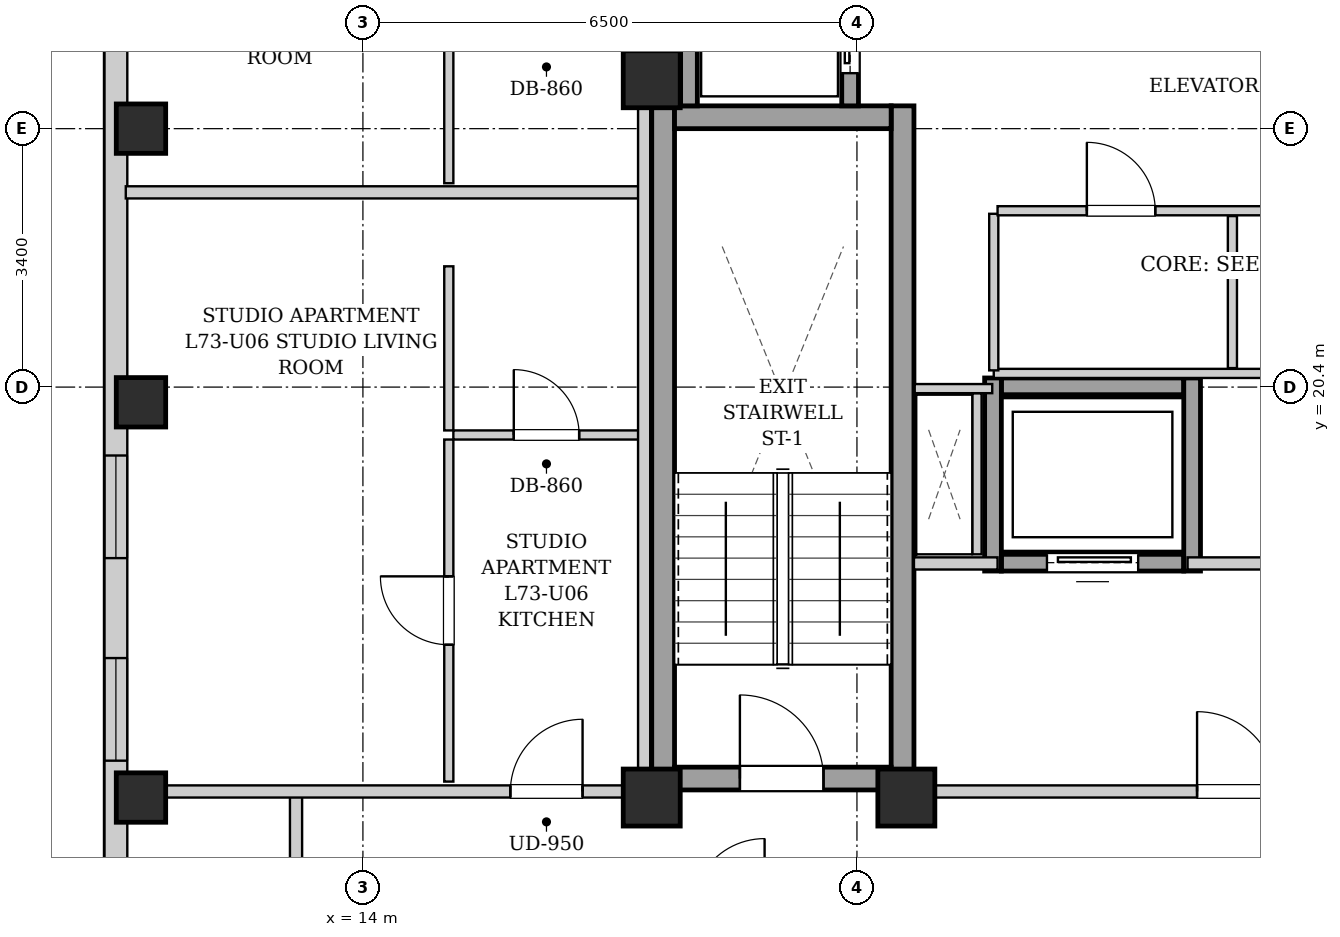
"""IFC4 building model, lengths in metres.
Left out: names, types, materials, properties, quantities, classifications, styles, units other than length and angle.
Written with IfcOpenShell. Run it as: python <this file> out.ifc"""

import sys

from ifc_helpers import new_model, si_unit, direction, frame, frame_2d, origin, origin_2d, place, context, subcontext, project, spatial, rectangle, extrude, element, fill, save


model = new_model("IFC4")
c1 = context("Model", 3, precision=1e-05, world=origin(), true_north=direction((0.0, 1.0)))
c2 = subcontext(c1, "Body", "Model", "MODEL_VIEW")
j1 = project(units=[si_unit("LENGTHUNIT", "METRE"), si_unit("PLANEANGLEUNIT", "RADIAN")], contexts=[c1])
p1 = place(None, origin())
s1 = spatial("IfcSite", under=j1, at=p1, CompositionType="ELEMENT")
p2 = place(p1, origin())
s2 = spatial("IfcBuilding", under=s1, at=p2, CompositionType="ELEMENT")
p3 = place(p2, frame((0.0, 0.0, 251.3)))
s3 = spatial("IfcBuildingStorey", under=s2, at=p3, CompositionType="ELEMENT", Elevation=251.3)
for number, where, z_axis, x_axis in (
    (1, (11.08, 15.0, 0.0), (0.0, 0.0, 1.0), (1.0, 0.0, 0.0)),
    (2, (11.08, 20.2, 0.0), (0.0, 0.0, 1.0), (1.0, 0.0, 0.0)),
    (3, (11.08, 23.8, 0.0), (0.0, 0.0, 1.0), (1.0, 0.0, 0.0)),
):
    element("IfcColumn", number, at=place(p3, frame(where, z_axis=z_axis, x_axis=x_axis)), inside=s3, PredefinedType="COLUMN", context=c2, shape_type="SweptSolid", body=[
        extrude(rectangle(XDim=0.65, YDim=0.65, at=origin_2d()), origin(), (0.0, 0.0, 1.0), 3.4),
    ])
for number, where, z_axis, x_axis in (
    (4, (17.8, 15.0, 0.0), (0.0, 0.0, 1.0), (1.0, 0.0, 0.0)),
    (5, (21.15, 15.0, 0.0), (0.0, 0.0, 1.0), (1.0, 0.0, 0.0)),
    (6, (17.8, 24.45, 0.0), (0.0, 0.0, 1.0), (1.0, 0.0, 0.0)),
):
    element("IfcColumn", number, at=place(p3, frame(where, z_axis=z_axis, x_axis=x_axis)), inside=s3, PredefinedType="COLUMN", context=c2, shape_type="SweptSolid", body=[
        extrude(rectangle(XDim=0.75, YDim=0.75, at=origin_2d()), origin(), (0.0, 0.0, 1.0), 3.4),
    ])
p4 = place(p3, frame((10.75, 6.3, 0.0), z_axis=(0.0, 0.0, 1.0), x_axis=(0.0, 1.0, 0.0)))
e7 = element("IfcWall", 7, at=p4, inside=s3, PredefinedType="SOLIDWALL", context=c2, shape_type="SweptSolid", body=[
    extrude(rectangle(XDim=31.4, YDim=0.3, at=frame_2d((15.7, 0.0))), origin(), (0.0, 0.0, 1.0), 3.14),
])
p5 = place(p4, frame((28.546, 0.0, 0.55)))
e8 = element("IfcOpeningElement", 8, at=p5, cuts=e7, PredefinedType="OPENING", context=c2, shape_type="SweptSolid", body=[
    extrude(rectangle(XDim=1.35, YDim=1.2, at=frame_2d((0.675, 0.6))), frame((0.0, 0.16, 0.0), z_axis=(0.0, -1.0, 0.0), x_axis=(1.0, 0.0, 0.0)), (0.0, 0.0, 1.0), 0.32),
])
p6 = place(p4, frame((11.85, 0.0, 0.55)))
e9 = element("IfcOpeningElement", 9, at=p6, cuts=e7, PredefinedType="OPENING", context=c2, shape_type="SweptSolid", body=[
    extrude(rectangle(XDim=1.35, YDim=1.2, at=frame_2d((0.675, 0.6))), frame((0.0, 0.16, 0.0), z_axis=(0.0, -1.0, 0.0), x_axis=(1.0, 0.0, 0.0)), (0.0, 0.0, 1.0), 0.32),
])
p7 = place(p4, frame((9.185, 0.0, 0.55)))
e10 = element("IfcOpeningElement", 10, at=p7, cuts=e7, PredefinedType="OPENING", context=c2, shape_type="SweptSolid", body=[
    extrude(rectangle(XDim=1.35, YDim=1.2, at=frame_2d((0.675, 0.6))), frame((0.0, 0.16, 0.0), z_axis=(0.0, -1.0, 0.0), x_axis=(1.0, 0.0, 0.0)), (0.0, 0.0, 1.0), 0.32),
])
p8 = place(p4, frame((19.006, 0.0, 0.55)))
e11 = element("IfcOpeningElement", 11, at=p8, cuts=e7, PredefinedType="OPENING", context=c2, shape_type="SweptSolid", body=[
    extrude(rectangle(XDim=1.35, YDim=1.2, at=frame_2d((0.675, 0.6))), frame((0.0, 0.16, 0.0), z_axis=(0.0, -1.0, 0.0), x_axis=(1.0, 0.0, 0.0)), (0.0, 0.0, 1.0), 0.32),
])
p9 = place(p4, frame((20.616, 0.0, 0.55)))
e12 = element("IfcOpeningElement", 12, at=p9, cuts=e7, PredefinedType="OPENING", context=c2, shape_type="SweptSolid", body=[
    extrude(rectangle(XDim=1.35, YDim=1.2, at=frame_2d((0.675, 0.6))), frame((0.0, 0.16, 0.0), z_axis=(0.0, -1.0, 0.0), x_axis=(1.0, 0.0, 0.0)), (0.0, 0.0, 1.0), 0.32),
])
for number, where, z_axis, x_axis in (
    (13, (17.95, 15.1, 0.0), (0.0, 0.0, 1.0), (0.0, 1.0, 0.0)),
    (14, (21.1, 15.1, 0.0), (0.0, 0.0, 1.0), (0.0, 1.0, 0.0)),
):
    element("IfcWall", number, at=place(p3, frame(where, z_axis=z_axis, x_axis=x_axis)), inside=s3, PredefinedType="SHEAR", context=c2, shape_type="SweptSolid", body=[
        extrude(rectangle(XDim=9.0, YDim=0.3, at=frame_2d((4.5, 0.0))), origin(), (0.0, 0.0, 1.0), 3.14),
    ])
p10 = place(p3, frame((18.1, 23.95, 0.0), z_axis=(0.0, 0.0, 1.0), x_axis=(1.0, 0.0, 0.0)))
e15 = element("IfcWall", 15, at=p10, inside=s3, PredefinedType="SHEAR", context=c2, shape_type="SweptSolid", body=[
    extrude(rectangle(XDim=2.85, YDim=0.3, at=frame_2d((1.425, 0.0))), origin(), (0.0, 0.0, 1.0), 3.14),
])
p11 = place(p3, frame((18.1, 15.25, 0.0), z_axis=(0.0, 0.0, 1.0), x_axis=(1.0, 0.0, 0.0)))
e16 = element("IfcWall", 16, at=p11, inside=s3, PredefinedType="SHEAR", context=c2, shape_type="SweptSolid", body=[
    extrude(rectangle(XDim=2.85, YDim=0.3, at=frame_2d((1.425, 0.0))), origin(), (0.0, 0.0, 1.0), 3.14),
])
p12 = place(p11, frame((0.86, 0.0, 0.0)))
e17 = element("IfcOpeningElement", 17, at=p12, cuts=e16, PredefinedType="OPENING", context=c2, shape_type="SweptSolid", body=[
    extrude(rectangle(XDim=1.1, YDim=2.05, at=frame_2d((0.55, 1.025))), frame((0.0, 0.16, 0.0), z_axis=(0.0, -1.0, 0.0), x_axis=(1.0, 0.0, 0.0)), (0.0, 0.0, 1.0), 0.32),
])
p13 = place(p3, frame((18.29, 24.1, 0.0), z_axis=(0.0, 0.0, 1.0), x_axis=(0.0, 1.0, 0.0)))
e18 = element("IfcWall", 18, at=p13, inside=s3, PredefinedType="SHEAR", context=c2, shape_type="SweptSolid", body=[
    extrude(rectangle(XDim=4.14, YDim=0.22, at=frame_2d((2.07, 0.0))), origin(), (0.0, 0.0, 1.0), 3.14),
])
p14 = place(p3, frame((20.41, 24.1, 0.0), z_axis=(0.0, 0.0, 1.0), x_axis=(0.0, 1.0, 0.0)))
e19 = element("IfcWall", 19, at=p14, inside=s3, PredefinedType="SHEAR", context=c2, shape_type="SweptSolid", body=[
    extrude(rectangle(XDim=1.96, YDim=0.22, at=frame_2d((0.98, 0.0))), origin(), (0.0, 0.0, 1.0), 3.14),
])
p15 = place(p14, frame((0.43, 0.0, 0.0)))
e20 = element("IfcOpeningElement", 20, at=p15, cuts=e19, PredefinedType="OPENING", context=c2, shape_type="SweptSolid", body=[
    extrude(rectangle(XDim=1.1, YDim=2.15, at=frame_2d((0.55, 1.075))), frame((0.0, 0.12, 0.0), z_axis=(0.0, -1.0, 0.0), x_axis=(1.0, 0.0, 0.0)), (0.0, 0.0, 1.0), 0.24),
])
p16 = place(p3, frame((22.4, 18.09, 0.0), z_axis=(0.0, 0.0, 1.0), x_axis=(1.0, 0.0, 0.0)))
e21 = element("IfcWall", 21, at=p16, inside=s3, PredefinedType="SHEAR", context=c2, shape_type="SweptSolid", body=[
    extrude(rectangle(XDim=2.4, YDim=0.22, at=frame_2d((1.2, 0.0))), origin(), (0.0, 0.0, 1.0), 3.14),
])
p17 = place(p16, frame((0.6, 0.0, 0.0)))
e22 = element("IfcOpeningElement", 22, at=p17, cuts=e21, PredefinedType="OPENING", context=c2, shape_type="SweptSolid", body=[
    extrude(rectangle(XDim=1.2, YDim=2.15, at=frame_2d((0.6, 1.075))), frame((0.0, 0.12, 0.0), z_axis=(0.0, -1.0, 0.0), x_axis=(1.0, 0.0, 0.0)), (0.0, 0.0, 1.0), 0.24),
])
p18 = place(p3, frame((22.4, 20.41, 0.0), z_axis=(0.0, 0.0, 1.0), x_axis=(1.0, 0.0, 0.0)))
e23 = element("IfcWall", 23, at=p18, inside=s3, PredefinedType="SHEAR", context=c2, shape_type="SweptSolid", body=[
    extrude(rectangle(XDim=2.4, YDim=0.22, at=frame_2d((1.2, 0.0))), origin(), (0.0, 0.0, 1.0), 3.14),
])
for number, where, z_axis, x_axis in (
    (24, (22.29, 17.98, 0.0), (0.0, 0.0, 1.0), (0.0, 1.0, 0.0)),
    (25, (24.91, 17.98, 0.0), (0.0, 0.0, 1.0), (0.0, 1.0, 0.0)),
):
    element("IfcWall", number, at=place(p3, frame(where, z_axis=z_axis, x_axis=x_axis)), inside=s3, PredefinedType="SHEAR", context=c2, shape_type="SweptSolid", body=[
        extrude(rectangle(XDim=2.54, YDim=0.22, at=frame_2d((1.27, 0.0))), origin(), (0.0, 0.0, 1.0), 3.14),
    ])
p19 = place(p3, frame((21.25, 15.08, 0.0), z_axis=(0.0, 0.0, 1.0), x_axis=(1.0, 0.0, 0.0)))
e26 = element("IfcWall", 26, at=p19, inside=s3, PredefinedType="PARTITIONING", context=c2, shape_type="SweptSolid", body=[
    extrude(rectangle(XDim=8.5, YDim=0.16, at=frame_2d((4.25, 0.0))), origin(), (0.0, 0.0, 1.0), 2.668),
])
p20 = place(p19, frame((3.725, 0.0, 0.0)))
e27 = element("IfcOpeningElement", 27, at=p20, cuts=e26, PredefinedType="OPENING", context=c2, shape_type="SweptSolid", body=[
    extrude(rectangle(XDim=1.05, YDim=2.05, at=frame_2d((0.525, 1.025))), frame((0.0, 0.09, 0.0), z_axis=(0.0, -1.0, 0.0), x_axis=(1.0, 0.0, 0.0)), (0.0, 0.0, 1.0), 0.18),
])
p21 = place(p3, frame((21.25, 18.08, 0.0), z_axis=(0.0, 0.0, 1.0), x_axis=(1.0, 0.0, 0.0)))
e28 = element("IfcWall", 28, at=p21, inside=s3, PredefinedType="PARTITIONING", context=c2, shape_type="SweptSolid", body=[
    extrude(rectangle(XDim=1.1, YDim=0.16, at=frame_2d((0.55, 0.0))), origin(), (0.0, 0.0, 1.0), 3.14),
])
p22 = place(p3, frame((24.85, 18.08, 0.0), z_axis=(0.0, 0.0, 1.0), x_axis=(1.0, 0.0, 0.0)))
e29 = element("IfcWall", 29, at=p22, inside=s3, PredefinedType="PARTITIONING", context=c2, shape_type="SweptSolid", body=[
    extrude(rectangle(XDim=1.3, YDim=0.16, at=frame_2d((0.65, 0.0))), origin(), (0.0, 0.0, 1.0), 3.14),
])
p23 = place(p3, frame((17.88, 24.12, 0.0), z_axis=(0.0, 0.0, 1.0), x_axis=(0.0, 1.0, 0.0)))
e30 = element("IfcWall", 30, at=p23, inside=s3, PredefinedType="PARTITIONING", context=c2, shape_type="SweptSolid", body=[
    extrude(rectangle(XDim=4.76, YDim=0.16, at=frame_2d((2.38, 0.0))), origin(), (0.0, 0.0, 1.0), 3.14),
])
p24 = place(p3, frame((22.08, 18.2, 0.0), z_axis=(0.0, 0.0, 1.0), x_axis=(0.0, 1.0, 0.0)))
e31 = element("IfcWall", 31, at=p24, inside=s3, PredefinedType="PARTITIONING", context=c2, shape_type="SweptSolid", body=[
    extrude(rectangle(XDim=2.12, YDim=0.12, at=frame_2d((1.06, 0.0))), origin(), (0.0, 0.0, 1.0), 3.14),
])
p25 = place(p3, frame((22.28, 20.38, 0.0), z_axis=(0.0, 0.0, 1.0), x_axis=(-1.0, 0.0, 0.0)))
e32 = element("IfcWall", 32, at=p25, inside=s3, PredefinedType="PARTITIONING", context=c2, shape_type="SweptSolid", body=[
    extrude(rectangle(XDim=1.02, YDim=0.12, at=frame_2d((0.51, 0.0))), origin(), (0.0, 0.0, 1.0), 3.14),
])
p26 = place(p3, frame((22.3, 20.58, 0.0), z_axis=(0.0, 0.0, 1.0), x_axis=(1.0, 0.0, 0.0)))
e33 = element("IfcWall", 33, at=p26, inside=s3, PredefinedType="PARTITIONING", context=c2, shape_type="SweptSolid", body=[
    extrude(rectangle(XDim=7.35, YDim=0.12, at=frame_2d((3.675, 0.0))), origin(), (0.0, 0.0, 1.0), 3.14),
])
p27 = place(p3, frame((22.3, 20.62, 0.0), z_axis=(0.0, 0.0, 1.0), x_axis=(0.0, 1.0, 0.0)))
e34 = element("IfcWall", 34, at=p27, inside=s3, PredefinedType="PARTITIONING", context=c2, shape_type="SweptSolid", body=[
    extrude(rectangle(XDim=2.06, YDim=0.12, at=frame_2d((1.03, 0.0))), origin(), (0.0, 0.0, 1.0), 3.14),
])
p28 = place(p3, frame((25.44, 20.65, 0.0), z_axis=(0.0, 0.0, 1.0), x_axis=(0.0, 1.0, 0.0)))
e35 = element("IfcWall", 35, at=p28, inside=s3, PredefinedType="PARTITIONING", context=c2, shape_type="SweptSolid", body=[
    extrude(rectangle(XDim=2.0, YDim=0.12, at=frame_2d((1.0, 0.0))), origin(), (0.0, 0.0, 1.0), 3.14),
])
p29 = place(p3, frame((22.35, 22.72, 0.0), z_axis=(0.0, 0.0, 1.0), x_axis=(1.0, 0.0, 0.0)))
e36 = element("IfcWall", 36, at=p29, inside=s3, PredefinedType="PARTITIONING", context=c2, shape_type="SweptSolid", body=[
    extrude(rectangle(XDim=7.27, YDim=0.12, at=frame_2d((3.635, 0.0))), origin(), (0.0, 0.0, 1.0), 3.14),
])
p30 = place(p29, frame((1.175, 0.0, 0.0)))
e37 = element("IfcOpeningElement", 37, at=p30, cuts=e36, PredefinedType="OPENING", context=c2, shape_type="SweptSolid", body=[
    extrude(rectangle(XDim=0.9, YDim=2.05, at=frame_2d((0.45, 1.025))), frame((0.0, 0.07, 0.0), z_axis=(0.0, -1.0, 0.0), x_axis=(1.0, 0.0, 0.0)), (0.0, 0.0, 1.0), 0.14),
])
p31 = place(p29, frame((4.725, 0.0, 0.0)))
e38 = element("IfcOpeningElement", 38, at=p31, cuts=e36, PredefinedType="OPENING", context=c2, shape_type="SweptSolid", body=[
    extrude(rectangle(XDim=0.9, YDim=2.05, at=frame_2d((0.45, 1.025))), frame((0.0, 0.07, 0.0), z_axis=(0.0, -1.0, 0.0), x_axis=(1.0, 0.0, 0.0)), (0.0, 0.0, 1.0), 0.14),
])
p32 = place(p3, frame((13.12, 13.51, 0.0), z_axis=(0.0, 0.0, 1.0), x_axis=(0.0, 1.0, 0.0)))
e39 = element("IfcWall", 39, at=p32, inside=s3, PredefinedType="PARTITIONING", context=c2, shape_type="SweptSolid", body=[
    extrude(rectangle(XDim=1.58, YDim=0.16, at=frame_2d((0.79, 0.0))), origin(), (0.0, 0.0, 1.0), 3.14),
])
p33 = place(p3, frame((10.88, 15.08, 0.0), z_axis=(0.0, 0.0, 1.0), x_axis=(1.0, 0.0, 0.0)))
e40 = element("IfcWall", 40, at=p33, inside=s3, PredefinedType="PARTITIONING", context=c2, shape_type="SweptSolid", body=[
    extrude(rectangle(XDim=6.88, YDim=0.16, at=frame_2d((3.44, 0.0))), origin(), (0.0, 0.0, 1.0), 2.668),
])
p34 = place(p33, frame((5.06, 0.0, 0.0)))
e41 = element("IfcOpeningElement", 41, at=p34, cuts=e40, PredefinedType="OPENING", context=c2, shape_type="SweptSolid", body=[
    extrude(rectangle(XDim=0.95, YDim=2.1, at=frame_2d((0.475, 1.05))), frame((0.0, 0.09, 0.0), z_axis=(0.0, -1.0, 0.0), x_axis=(1.0, 0.0, 0.0)), (0.0, 0.0, 1.0), 0.18),
])
p35 = place(p3, frame((10.88, 22.962, 0.0), z_axis=(0.0, 0.0, 1.0), x_axis=(1.0, 0.0, 0.0)))
e42 = element("IfcWall", 42, at=p35, inside=s3, PredefinedType="PARTITIONING", context=c2, shape_type="SweptSolid", body=[
    extrude(rectangle(XDim=6.76, YDim=0.16, at=frame_2d((3.38, 0.0))), origin(), (0.0, 0.0, 1.0), 3.14),
])
p36 = place(p3, frame((15.19, 19.77, 0.0), z_axis=(0.0, 0.0, 1.0), x_axis=(1.0, 0.0, 0.0)))
e43 = element("IfcWall", 43, at=p36, inside=s3, PredefinedType="PARTITIONING", context=c2, shape_type="SweptSolid", body=[
    extrude(rectangle(XDim=2.45, YDim=0.12, at=frame_2d((1.225, 0.0))), origin(), (0.0, 0.0, 1.0), 3.14),
])
p37 = place(p36, frame((0.795, 0.0, 0.0)))
e44 = element("IfcOpeningElement", 44, at=p37, cuts=e43, PredefinedType="OPENING", context=c2, shape_type="SweptSolid", body=[
    extrude(rectangle(XDim=0.86, YDim=2.05, at=frame_2d((0.43, 1.025))), frame((0.0, 0.07, 0.0), z_axis=(0.0, -1.0, 0.0), x_axis=(1.0, 0.0, 0.0)), (0.0, 0.0, 1.0), 0.14),
])
p38 = place(p3, frame((15.13, 19.83, 0.0), z_axis=(0.0, 0.0, 1.0), x_axis=(0.0, 1.0, 0.0)))
e45 = element("IfcWall", 45, at=p38, inside=s3, PredefinedType="PARTITIONING", context=c2, shape_type="SweptSolid", body=[
    extrude(rectangle(XDim=2.159, YDim=0.12, at=frame_2d((1.08, 0.0))), origin(), (0.0, 0.0, 1.0), 3.14),
])
p39 = place(p3, frame((15.13, 15.21, 0.0), z_axis=(0.0, 0.0, 1.0), x_axis=(0.0, 1.0, 0.0)))
e46 = element("IfcWall", 46, at=p39, inside=s3, PredefinedType="PARTITIONING", context=c2, shape_type="SweptSolid", body=[
    extrude(rectangle(XDim=4.5, YDim=0.12, at=frame_2d((2.25, 0.0))), origin(), (0.0, 0.0, 1.0), 3.14),
])
p40 = place(p39, frame((1.8, 0.0, 0.0)))
e47 = element("IfcOpeningElement", 47, at=p40, cuts=e46, PredefinedType="OPENING", context=c2, shape_type="SweptSolid", body=[
    extrude(rectangle(XDim=0.9, YDim=2.05, at=frame_2d((0.45, 1.025))), frame((0.0, 0.07, 0.0), z_axis=(0.0, -1.0, 0.0), x_axis=(1.0, 0.0, 0.0)), (0.0, 0.0, 1.0), 0.14),
])
p41 = place(p3, frame((15.13, 23.082, 0.0), z_axis=(0.0, 0.0, 1.0), x_axis=(0.0, 1.0, 0.0)))
e48 = element("IfcWall", 48, at=p41, inside=s3, PredefinedType="PARTITIONING", context=c2, shape_type="SweptSolid", body=[
    extrude(rectangle(XDim=1.85, YDim=0.12, at=frame_2d((0.925, 0.0))), origin(), (0.0, 0.0, 1.0), 3.14),
])
p42 = place(p3, frame((17.7, 15.02, 0.0), z_axis=(0.0, 0.0, 1.0), x_axis=(0.0, 1.0, 0.0)))
e49 = element("IfcWall", 49, at=p42, inside=s3, PredefinedType="PARTITIONING", context=c2, shape_type="SweptSolid", body=[
    extrude(rectangle(XDim=13.98, YDim=0.16, at=frame_2d((6.99, 0.0))), origin(), (0.0, 0.0, 1.0), 3.14),
])
p43 = place(p12, origin())
e50 = element("IfcDoor", 50, at=p43, inside=s3, OperationType="SINGLE_SWING_LEFT", PredefinedType="DOOR", context=c2, shape_type="SweptSolid", body=[
    extrude(rectangle(XDim=1.1, YDim=2.05, at=frame_2d((0.55, 1.025))), frame((0.0, 0.025, 0.0), z_axis=(0.0, -1.0, 0.0), x_axis=(1.0, 0.0, 0.0)), (0.0, 0.0, 1.0), 0.05),
])
fill(e17, e50)
p44 = place(p15, origin())
e51 = element("IfcDoor", 51, at=p44, inside=s3, OperationType="SLIDING_TO_LEFT", PredefinedType="DOOR", context=c2, shape_type="SweptSolid", body=[
    extrude(rectangle(XDim=1.1, YDim=2.15, at=frame_2d((0.55, 1.075))), frame((0.0, 0.025, 0.0), z_axis=(0.0, -1.0, 0.0), x_axis=(1.0, 0.0, 0.0)), (0.0, 0.0, 1.0), 0.05),
])
fill(e20, e51)
p45 = place(p17, origin())
e52 = element("IfcDoor", 52, at=p45, inside=s3, OperationType="SLIDING_TO_LEFT", PredefinedType="DOOR", context=c2, shape_type="SweptSolid", body=[
    extrude(rectangle(XDim=1.2, YDim=2.15, at=frame_2d((0.6, 1.075))), frame((0.0, 0.025, 0.0), z_axis=(0.0, -1.0, 0.0), x_axis=(1.0, 0.0, 0.0)), (0.0, 0.0, 1.0), 0.05),
])
fill(e22, e52)
p46 = place(p20, origin())
e53 = element("IfcDoor", 53, at=p46, inside=s3, OperationType="SINGLE_SWING_LEFT", PredefinedType="DOOR", context=c2, shape_type="SweptSolid", body=[
    extrude(rectangle(XDim=1.05, YDim=2.05, at=frame_2d((0.525, 1.025))), frame((0.0, 0.025, 0.0), z_axis=(0.0, -1.0, 0.0), x_axis=(1.0, 0.0, 0.0)), (0.0, 0.0, 1.0), 0.05),
])
fill(e27, e53)
p47 = place(p30, origin())
e54 = element("IfcDoor", 54, at=p47, inside=s3, OperationType="SINGLE_SWING_LEFT", PredefinedType="DOOR", context=c2, shape_type="SweptSolid", body=[
    extrude(rectangle(XDim=0.9, YDim=2.05, at=frame_2d((0.45, 1.025))), frame((0.0, 0.025, 0.0), z_axis=(0.0, -1.0, 0.0), x_axis=(1.0, 0.0, 0.0)), (0.0, 0.0, 1.0), 0.05),
])
fill(e37, e54)
p48 = place(p34, origin())
e55 = element("IfcDoor", 55, at=p48, inside=s3, OperationType="SINGLE_SWING_RIGHT", PredefinedType="DOOR", context=c2, shape_type="SweptSolid", body=[
    extrude(rectangle(XDim=0.95, YDim=2.1, at=frame_2d((0.475, 1.05))), frame((0.0, 0.025, 0.0), z_axis=(0.0, -1.0, 0.0), x_axis=(1.0, 0.0, 0.0)), (0.0, 0.0, 1.0), 0.05),
])
fill(e41, e55)
p49 = place(p37, origin())
e56 = element("IfcDoor", 56, at=p49, inside=s3, OperationType="SINGLE_SWING_LEFT", PredefinedType="DOOR", context=c2, shape_type="SweptSolid", body=[
    extrude(rectangle(XDim=0.86, YDim=2.05, at=frame_2d((0.43, 1.025))), frame((0.0, 0.025, 0.0), z_axis=(0.0, -1.0, 0.0), x_axis=(1.0, 0.0, 0.0)), (0.0, 0.0, 1.0), 0.05),
])
fill(e44, e56)
p50 = place(p40, origin())
e57 = element("IfcDoor", 57, at=p50, inside=s3, OperationType="SINGLE_SWING_RIGHT", PredefinedType="DOOR", context=c2, shape_type="SweptSolid", body=[
    extrude(rectangle(XDim=0.9, YDim=2.05, at=frame_2d((0.45, 1.025))), frame((0.0, 0.025, 0.0), z_axis=(0.0, -1.0, 0.0), x_axis=(1.0, 0.0, 0.0)), (0.0, 0.0, 1.0), 0.05),
])
fill(e47, e57)
p51 = place(p6, origin())
e58 = element("IfcWindow", 58, at=p51, inside=s3, PartitioningType="SINGLE_PANEL", PredefinedType="WINDOW", context=c2, shape_type="SweptSolid", body=[
    extrude(rectangle(XDim=1.35, YDim=1.2, at=frame_2d((0.675, 0.6))), frame((0.0, 0.03, 0.0), z_axis=(0.0, -1.0, 0.0), x_axis=(1.0, 0.0, 0.0)), (0.0, 0.0, 1.0), 0.06),
])
fill(e9, e58)
p52 = place(p7, origin())
e59 = element("IfcWindow", 59, at=p52, inside=s3, PartitioningType="SINGLE_PANEL", PredefinedType="WINDOW", context=c2, shape_type="SweptSolid", body=[
    extrude(rectangle(XDim=1.35, YDim=1.2, at=frame_2d((0.675, 0.6))), frame((0.0, 0.03, 0.0), z_axis=(0.0, -1.0, 0.0), x_axis=(1.0, 0.0, 0.0)), (0.0, 0.0, 1.0), 0.06),
])
fill(e10, e59)
save(model, sys.argv[1])
